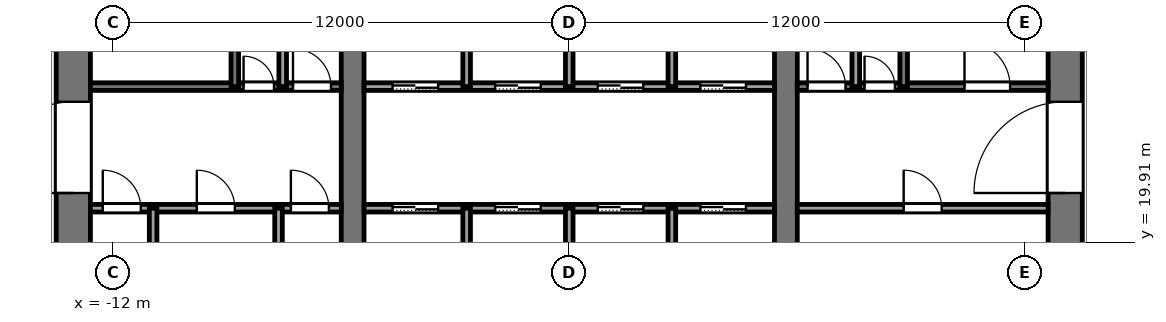
"""IFC4 building model, lengths in metres.
Left out: names, types, materials, properties, quantities, classifications, styles, units other than length and angle.
Written with IfcOpenShell. Run it as: python <this file> out.ifc"""

import sys

from ifc_helpers import new_model, si_unit, direction, frame, frame_2d, origin, place, context, subcontext, project, spatial, rectangle, extrude, element, fill, save


model = new_model("IFC4")
c1 = context("Model", 3, precision=1e-05, world=origin(), true_north=direction((0.0, 1.0)))
c2 = subcontext(c1, "Body", "Model", "MODEL_VIEW")
j1 = project(units=[si_unit("LENGTHUNIT", "METRE"), si_unit("PLANEANGLEUNIT", "RADIAN")], contexts=[c1])
p1 = place(None, origin())
s1 = spatial("IfcSite", under=j1, at=p1, CompositionType="ELEMENT")
p2 = place(p1, origin())
s2 = spatial("IfcBuilding", under=s1, at=p2, CompositionType="ELEMENT")
p3 = place(p2, frame((0.0, 0.0, 202.0)))
s3 = spatial("IfcBuildingStorey", under=s2, at=p3, CompositionType="ELEMENT", Elevation=202.0)
p4 = place(p3, frame((-13.05, 18.4, -0.13), z_axis=(0.0, 0.0, 1.0), x_axis=(0.0, 1.0, 0.0)))
e1 = element("IfcWall", 1, at=p4, inside=s3, PredefinedType="SHEAR", context=c2, shape_type="SweptSolid", body=[
    extrude(rectangle(XDim=19.2, YDim=0.9, at=frame_2d((9.6, 0.0))), origin(), (0.0, 0.0, 1.0), 4.0),
])
p5 = place(p4, frame((2.8, 0.0, 0.13)))
e2 = element("IfcOpeningElement", 2, at=p5, cuts=e1, PredefinedType="OPENING", context=c2, shape_type="SweptSolid", body=[
    extrude(rectangle(XDim=2.4, YDim=2.4, at=frame_2d((1.2, 1.2))), frame((0.0, 0.46, 0.0), z_axis=(0.0, -1.0, 0.0), x_axis=(1.0, 0.0, 0.0)), (0.0, 0.0, 1.0), 0.92),
])
p6 = place(p4, frame((13.4, 0.0, 0.13)))
e3 = element("IfcOpeningElement", 3, at=p6, cuts=e1, PredefinedType="OPENING", context=c2, shape_type="SweptSolid", body=[
    extrude(rectangle(XDim=1.4, YDim=2.2, at=frame_2d((0.7, 1.1))), frame((0.0, 0.46, 0.0), z_axis=(0.0, -1.0, 0.0), x_axis=(1.0, 0.0, 0.0)), (0.0, 0.0, 1.0), 0.92),
])
p7 = place(p3, frame((13.05, 18.4, -0.13), z_axis=(0.0, 0.0, 1.0), x_axis=(0.0, 1.0, 0.0)))
e4 = element("IfcWall", 4, at=p7, inside=s3, PredefinedType="SHEAR", context=c2, shape_type="SweptSolid", body=[
    extrude(rectangle(XDim=19.2, YDim=0.9, at=frame_2d((9.6, 0.0))), origin(), (0.0, 0.0, 1.0), 4.0),
])
p8 = place(p7, frame((2.8, 0.0, 0.13)))
e5 = element("IfcOpeningElement", 5, at=p8, cuts=e4, PredefinedType="OPENING", context=c2, shape_type="SweptSolid", body=[
    extrude(rectangle(XDim=2.4, YDim=2.4, at=frame_2d((1.2, 1.2))), frame((0.0, 0.46, 0.0), z_axis=(0.0, -1.0, 0.0), x_axis=(1.0, 0.0, 0.0)), (0.0, 0.0, 1.0), 0.92),
])
p9 = place(p7, frame((13.3, 0.0, 0.13)))
e6 = element("IfcOpeningElement", 6, at=p9, cuts=e4, PredefinedType="OPENING", context=c2, shape_type="SweptSolid", body=[
    extrude(rectangle(XDim=2.4, YDim=2.4, at=frame_2d((1.2, 1.2))), frame((0.0, 0.46, 0.0), z_axis=(0.0, -1.0, 0.0), x_axis=(1.0, 0.0, 0.0)), (0.0, 0.0, 1.0), 0.92),
])
p10 = place(p3, frame((-5.7, 18.4, -0.13), z_axis=(0.0, 0.0, 1.0), x_axis=(0.0, 1.0, 0.0)))
e7 = element("IfcWall", 7, at=p10, inside=s3, PredefinedType="SHEAR", context=c2, shape_type="SweptSolid", body=[
    extrude(rectangle(XDim=19.2, YDim=0.6, at=frame_2d((9.6, 0.0))), origin(), (0.0, 0.0, 1.0), 4.0),
])
p11 = place(p10, frame((8.35, 0.0, 0.13)))
e8 = element("IfcOpeningElement", 8, at=p11, cuts=e7, PredefinedType="OPENING", context=c2, shape_type="SweptSolid", body=[
    extrude(rectangle(XDim=0.9, YDim=2.1, at=frame_2d((0.45, 1.05))), frame((0.0, 0.31, 0.0), z_axis=(0.0, -1.0, 0.0), x_axis=(1.0, 0.0, 0.0)), (0.0, 0.0, 1.0), 0.62),
])
p12 = place(p3, frame((5.7, 18.4, -0.13), z_axis=(0.0, 0.0, 1.0), x_axis=(0.0, 1.0, 0.0)))
e9 = element("IfcWall", 9, at=p12, inside=s3, PredefinedType="SHEAR", context=c2, shape_type="SweptSolid", body=[
    extrude(rectangle(XDim=19.2, YDim=0.6, at=frame_2d((9.6, 0.0))), origin(), (0.0, 0.0, 1.0), 4.0),
])
p13 = place(p12, frame((8.35, 0.0, 0.13)))
e10 = element("IfcOpeningElement", 10, at=p13, cuts=e9, PredefinedType="OPENING", context=c2, shape_type="SweptSolid", body=[
    extrude(rectangle(XDim=0.9, YDim=2.1, at=frame_2d((0.45, 1.05))), frame((0.0, 0.31, 0.0), z_axis=(0.0, -1.0, 0.0), x_axis=(1.0, 0.0, 0.0)), (0.0, 0.0, 1.0), 0.62),
])
p14 = place(p12, frame((13.3, 0.0, 0.13)))
e11 = element("IfcOpeningElement", 11, at=p14, cuts=e9, PredefinedType="OPENING", context=c2, shape_type="SweptSolid", body=[
    extrude(rectangle(XDim=2.4, YDim=2.4, at=frame_2d((1.2, 1.2))), frame((0.0, 0.31, 0.0), z_axis=(0.0, -1.0, 0.0), x_axis=(1.0, 0.0, 0.0)), (0.0, 0.0, 1.0), 0.62),
])
p15 = place(p3, frame((-12.6, 20.8, 0.0), z_axis=(0.0, 0.0, 1.0), x_axis=(1.0, 0.0, 0.0)))
e12 = element("IfcWall", 12, at=p15, inside=s3, PredefinedType="PARTITIONING", context=c2, shape_type="SweptSolid", body=[
    extrude(rectangle(XDim=6.6, YDim=0.2, at=frame_2d((3.3, 0.0))), origin(), (0.0, 0.0, 1.0), 3.87),
])
p16 = place(p15, frame((0.325, 0.0, 0.0)))
e13 = element("IfcOpeningElement", 13, at=p16, cuts=e12, PredefinedType="OPENING", context=c2, shape_type="SweptSolid", body=[
    extrude(rectangle(XDim=1.0, YDim=2.1, at=frame_2d((0.5, 1.05))), frame((0.0, 0.11, 0.0), z_axis=(0.0, -1.0, 0.0), x_axis=(1.0, 0.0, 0.0)), (0.0, 0.0, 1.0), 0.22),
])
p17 = place(p15, frame((2.8, 0.0, 0.0)))
e14 = element("IfcOpeningElement", 14, at=p17, cuts=e12, PredefinedType="OPENING", context=c2, shape_type="SweptSolid", body=[
    extrude(rectangle(XDim=1.0, YDim=2.1, at=frame_2d((0.5, 1.05))), frame((0.0, 0.11, 0.0), z_axis=(0.0, -1.0, 0.0), x_axis=(1.0, 0.0, 0.0)), (0.0, 0.0, 1.0), 0.22),
])
p18 = place(p15, frame((5.275, 0.0, 0.0)))
e15 = element("IfcOpeningElement", 15, at=p18, cuts=e12, PredefinedType="OPENING", context=c2, shape_type="SweptSolid", body=[
    extrude(rectangle(XDim=1.0, YDim=2.1, at=frame_2d((0.5, 1.05))), frame((0.0, 0.11, 0.0), z_axis=(0.0, -1.0, 0.0), x_axis=(1.0, 0.0, 0.0)), (0.0, 0.0, 1.0), 0.22),
])
p19 = place(p3, frame((-5.4, 20.8, 0.0), z_axis=(0.0, 0.0, 1.0), x_axis=(1.0, 0.0, 0.0)))
e16 = element("IfcWall", 16, at=p19, inside=s3, PredefinedType="PARTITIONING", context=c2, shape_type="SweptSolid", body=[
    extrude(rectangle(XDim=10.8, YDim=0.2, at=frame_2d((5.4, 0.0))), origin(), (0.0, 0.0, 1.0), 3.87),
])
p20 = place(p19, frame((0.75, 0.0, 0.0)))
e17 = element("IfcOpeningElement", 17, at=p20, cuts=e16, PredefinedType="OPENING", context=c2, shape_type="SweptSolid", body=[
    extrude(rectangle(XDim=1.2, YDim=2.2, at=frame_2d((0.6, 1.1))), frame((0.0, 0.11, 0.0), z_axis=(0.0, -1.0, 0.0), x_axis=(1.0, 0.0, 0.0)), (0.0, 0.0, 1.0), 0.22),
])
p21 = place(p19, frame((3.45, 0.0, 0.0)))
e18 = element("IfcOpeningElement", 18, at=p21, cuts=e16, PredefinedType="OPENING", context=c2, shape_type="SweptSolid", body=[
    extrude(rectangle(XDim=1.2, YDim=2.2, at=frame_2d((0.6, 1.1))), frame((0.0, 0.11, 0.0), z_axis=(0.0, -1.0, 0.0), x_axis=(1.0, 0.0, 0.0)), (0.0, 0.0, 1.0), 0.22),
])
p22 = place(p19, frame((6.15, 0.0, 0.0)))
e19 = element("IfcOpeningElement", 19, at=p22, cuts=e16, PredefinedType="OPENING", context=c2, shape_type="SweptSolid", body=[
    extrude(rectangle(XDim=1.2, YDim=2.2, at=frame_2d((0.6, 1.1))), frame((0.0, 0.11, 0.0), z_axis=(0.0, -1.0, 0.0), x_axis=(1.0, 0.0, 0.0)), (0.0, 0.0, 1.0), 0.22),
])
p23 = place(p19, frame((8.85, 0.0, 0.0)))
e20 = element("IfcOpeningElement", 20, at=p23, cuts=e16, PredefinedType="OPENING", context=c2, shape_type="SweptSolid", body=[
    extrude(rectangle(XDim=1.2, YDim=2.2, at=frame_2d((0.6, 1.1))), frame((0.0, 0.11, 0.0), z_axis=(0.0, -1.0, 0.0), x_axis=(1.0, 0.0, 0.0)), (0.0, 0.0, 1.0), 0.22),
])
p24 = place(p3, frame((6.0, 20.8, 0.0), z_axis=(0.0, 0.0, 1.0), x_axis=(1.0, 0.0, 0.0)))
e21 = element("IfcWall", 21, at=p24, inside=s3, PredefinedType="PARTITIONING", context=c2, shape_type="SweptSolid", body=[
    extrude(rectangle(XDim=6.6, YDim=0.2, at=frame_2d((3.3, 0.0))), origin(), (0.0, 0.0, 1.0), 3.87),
])
p25 = place(p24, frame((2.8, 0.0, 0.0)))
e22 = element("IfcOpeningElement", 22, at=p25, cuts=e21, PredefinedType="OPENING", context=c2, shape_type="SweptSolid", body=[
    extrude(rectangle(XDim=1.0, YDim=2.1, at=frame_2d((0.5, 1.05))), frame((0.0, 0.11, 0.0), z_axis=(0.0, -1.0, 0.0), x_axis=(1.0, 0.0, 0.0)), (0.0, 0.0, 1.0), 0.22),
])
p26 = place(p3, frame((-12.6, 24.0, 0.0), z_axis=(0.0, 0.0, 1.0), x_axis=(1.0, 0.0, 0.0)))
e23 = element("IfcWall", 23, at=p26, inside=s3, PredefinedType="PARTITIONING", context=c2, shape_type="SweptSolid", body=[
    extrude(rectangle(XDim=6.6, YDim=0.2, at=frame_2d((3.3, 0.0))), origin(), (0.0, 0.0, 1.0), 3.87),
])
p27 = place(p26, frame((4.03, 0.0, 0.0)))
e24 = element("IfcOpeningElement", 24, at=p27, cuts=e23, PredefinedType="OPENING", context=c2, shape_type="SweptSolid", body=[
    extrude(rectangle(XDim=0.8, YDim=2.1, at=frame_2d((0.4, 1.05))), frame((0.0, 0.11, 0.0), z_axis=(0.0, -1.0, 0.0), x_axis=(1.0, 0.0, 0.0)), (0.0, 0.0, 1.0), 0.22),
])
p28 = place(p26, frame((5.33, 0.0, 0.0)))
e25 = element("IfcOpeningElement", 25, at=p28, cuts=e23, PredefinedType="OPENING", context=c2, shape_type="SweptSolid", body=[
    extrude(rectangle(XDim=1.0, YDim=2.1, at=frame_2d((0.5, 1.05))), frame((0.0, 0.11, 0.0), z_axis=(0.0, -1.0, 0.0), x_axis=(1.0, 0.0, 0.0)), (0.0, 0.0, 1.0), 0.22),
])
p29 = place(p3, frame((-5.4, 24.0, 0.0), z_axis=(0.0, 0.0, 1.0), x_axis=(1.0, 0.0, 0.0)))
e26 = element("IfcWall", 26, at=p29, inside=s3, PredefinedType="PARTITIONING", context=c2, shape_type="SweptSolid", body=[
    extrude(rectangle(XDim=10.8, YDim=0.2, at=frame_2d((5.4, 0.0))), origin(), (0.0, 0.0, 1.0), 3.87),
])
p30 = place(p29, frame((0.75, 0.0, 0.0)))
e27 = element("IfcOpeningElement", 27, at=p30, cuts=e26, PredefinedType="OPENING", context=c2, shape_type="SweptSolid", body=[
    extrude(rectangle(XDim=1.2, YDim=2.2, at=frame_2d((0.6, 1.1))), frame((0.0, 0.11, 0.0), z_axis=(0.0, -1.0, 0.0), x_axis=(1.0, 0.0, 0.0)), (0.0, 0.0, 1.0), 0.22),
])
p31 = place(p29, frame((3.45, 0.0, 0.0)))
e28 = element("IfcOpeningElement", 28, at=p31, cuts=e26, PredefinedType="OPENING", context=c2, shape_type="SweptSolid", body=[
    extrude(rectangle(XDim=1.2, YDim=2.2, at=frame_2d((0.6, 1.1))), frame((0.0, 0.11, 0.0), z_axis=(0.0, -1.0, 0.0), x_axis=(1.0, 0.0, 0.0)), (0.0, 0.0, 1.0), 0.22),
])
p32 = place(p29, frame((6.15, 0.0, 0.0)))
e29 = element("IfcOpeningElement", 29, at=p32, cuts=e26, PredefinedType="OPENING", context=c2, shape_type="SweptSolid", body=[
    extrude(rectangle(XDim=1.2, YDim=2.2, at=frame_2d((0.6, 1.1))), frame((0.0, 0.11, 0.0), z_axis=(0.0, -1.0, 0.0), x_axis=(1.0, 0.0, 0.0)), (0.0, 0.0, 1.0), 0.22),
])
p33 = place(p29, frame((8.85, 0.0, 0.0)))
e30 = element("IfcOpeningElement", 30, at=p33, cuts=e26, PredefinedType="OPENING", context=c2, shape_type="SweptSolid", body=[
    extrude(rectangle(XDim=1.2, YDim=2.2, at=frame_2d((0.6, 1.1))), frame((0.0, 0.11, 0.0), z_axis=(0.0, -1.0, 0.0), x_axis=(1.0, 0.0, 0.0)), (0.0, 0.0, 1.0), 0.22),
])
p34 = place(p3, frame((6.0, 24.0, 0.0), z_axis=(0.0, 0.0, 1.0), x_axis=(1.0, 0.0, 0.0)))
e31 = element("IfcWall", 31, at=p34, inside=s3, PredefinedType="PARTITIONING", context=c2, shape_type="SweptSolid", body=[
    extrude(rectangle(XDim=6.6, YDim=0.2, at=frame_2d((3.3, 0.0))), origin(), (0.0, 0.0, 1.0), 3.87),
])
p35 = place(p34, frame((0.27, 0.0, 0.0)))
e32 = element("IfcOpeningElement", 32, at=p35, cuts=e31, PredefinedType="OPENING", context=c2, shape_type="SweptSolid", body=[
    extrude(rectangle(XDim=1.0, YDim=2.1, at=frame_2d((0.5, 1.05))), frame((0.0, 0.11, 0.0), z_axis=(0.0, -1.0, 0.0), x_axis=(1.0, 0.0, 0.0)), (0.0, 0.0, 1.0), 0.22),
])
p36 = place(p34, frame((1.77, 0.0, 0.0)))
e33 = element("IfcOpeningElement", 33, at=p36, cuts=e31, PredefinedType="OPENING", context=c2, shape_type="SweptSolid", body=[
    extrude(rectangle(XDim=0.8, YDim=2.1, at=frame_2d((0.4, 1.05))), frame((0.0, 0.11, 0.0), z_axis=(0.0, -1.0, 0.0), x_axis=(1.0, 0.0, 0.0)), (0.0, 0.0, 1.0), 0.22),
])
p37 = place(p34, frame((4.4, 0.0, 0.0)))
e34 = element("IfcOpeningElement", 34, at=p37, cuts=e31, PredefinedType="OPENING", context=c2, shape_type="SweptSolid", body=[
    extrude(rectangle(XDim=1.2, YDim=2.2, at=frame_2d((0.6, 1.1))), frame((0.0, 0.11, 0.0), z_axis=(0.0, -1.0, 0.0), x_axis=(1.0, 0.0, 0.0)), (0.0, 0.0, 1.0), 0.22),
])
p38 = place(p3, frame((-10.95, 18.4, 0.0), z_axis=(0.0, 0.0, 1.0), x_axis=(0.0, 1.0, 0.0)))
e35 = element("IfcWall", 35, at=p38, inside=s3, PredefinedType="PARTITIONING", context=c2, shape_type="SweptSolid", body=[
    extrude(rectangle(XDim=2.4, YDim=0.2, at=frame_2d((1.2, 0.0))), origin(), (0.0, 0.0, 1.0), 3.87),
])
p39 = place(p3, frame((-8.8, 24.0, 0.0), z_axis=(0.0, 0.0, 1.0), x_axis=(0.0, 1.0, 0.0)))
e36 = element("IfcWall", 36, at=p39, inside=s3, PredefinedType="PARTITIONING", context=c2, shape_type="SweptSolid", body=[
    extrude(rectangle(XDim=7.4, YDim=0.2, at=frame_2d((3.7, 0.0))), origin(), (0.0, 0.0, 1.0), 3.87),
])
p40 = place(p3, frame((-7.65, 18.4, 0.0), z_axis=(0.0, 0.0, 1.0), x_axis=(0.0, 1.0, 0.0)))
e37 = element("IfcWall", 37, at=p40, inside=s3, PredefinedType="PARTITIONING", context=c2, shape_type="SweptSolid", body=[
    extrude(rectangle(XDim=2.4, YDim=0.2, at=frame_2d((1.2, 0.0))), origin(), (0.0, 0.0, 1.0), 3.87),
])
p41 = place(p3, frame((-7.54, 24.0, 0.0), z_axis=(0.0, 0.0, 1.0), x_axis=(0.0, 1.0, 0.0)))
e38 = element("IfcWall", 38, at=p41, inside=s3, PredefinedType="PARTITIONING", context=c2, shape_type="SweptSolid", body=[
    extrude(rectangle(XDim=7.4, YDim=0.2, at=frame_2d((3.7, 0.0))), origin(), (0.0, 0.0, 1.0), 3.87),
])
p42 = place(p3, frame((-2.7, 18.4, 0.0), z_axis=(0.0, 0.0, 1.0), x_axis=(0.0, 1.0, 0.0)))
e39 = element("IfcWall", 39, at=p42, inside=s3, PredefinedType="PARTITIONING", context=c2, shape_type="SweptSolid", body=[
    extrude(rectangle(XDim=2.4, YDim=0.2, at=frame_2d((1.2, 0.0))), origin(), (0.0, 0.0, 1.0), 3.87),
])
p43 = place(p3, frame((-2.7, 24.0, 0.0), z_axis=(0.0, 0.0, 1.0), x_axis=(0.0, 1.0, 0.0)))
e40 = element("IfcWall", 40, at=p43, inside=s3, PredefinedType="PARTITIONING", context=c2, shape_type="SweptSolid", body=[
    extrude(rectangle(XDim=2.4, YDim=0.2, at=frame_2d((1.2, 0.0))), origin(), (0.0, 0.0, 1.0), 3.87),
])
p44 = place(p3, frame((0.0, 18.4, 0.0), z_axis=(0.0, 0.0, 1.0), x_axis=(0.0, 1.0, 0.0)))
e41 = element("IfcWall", 41, at=p44, inside=s3, PredefinedType="PARTITIONING", context=c2, shape_type="SweptSolid", body=[
    extrude(rectangle(XDim=2.4, YDim=0.2, at=frame_2d((1.2, 0.0))), origin(), (0.0, 0.0, 1.0), 3.87),
])
p45 = place(p3, frame((0.0, 24.0, 0.0), z_axis=(0.0, 0.0, 1.0), x_axis=(0.0, 1.0, 0.0)))
e42 = element("IfcWall", 42, at=p45, inside=s3, PredefinedType="PARTITIONING", context=c2, shape_type="SweptSolid", body=[
    extrude(rectangle(XDim=4.0, YDim=0.2, at=frame_2d((2.0, 0.0))), origin(), (0.0, 0.0, 1.0), 3.87),
])
p46 = place(p3, frame((2.7, 18.4, 0.0), z_axis=(0.0, 0.0, 1.0), x_axis=(0.0, 1.0, 0.0)))
e43 = element("IfcWall", 43, at=p46, inside=s3, PredefinedType="PARTITIONING", context=c2, shape_type="SweptSolid", body=[
    extrude(rectangle(XDim=2.4, YDim=0.2, at=frame_2d((1.2, 0.0))), origin(), (0.0, 0.0, 1.0), 3.87),
])
p47 = place(p3, frame((2.7, 24.0, 0.0), z_axis=(0.0, 0.0, 1.0), x_axis=(0.0, 1.0, 0.0)))
e44 = element("IfcWall", 44, at=p47, inside=s3, PredefinedType="PARTITIONING", context=c2, shape_type="SweptSolid", body=[
    extrude(rectangle(XDim=2.4, YDim=0.2, at=frame_2d((1.2, 0.0))), origin(), (0.0, 0.0, 1.0), 3.87),
])
for number, where, z_axis, x_axis in (
    (45, (7.54, 24.0, 0.0), (0.0, 0.0, 1.0), (0.0, 1.0, 0.0)),
    (46, (8.8, 24.0, 0.0), (0.0, 0.0, 1.0), (0.0, 1.0, 0.0)),
):
    element("IfcWall", number, at=place(p3, frame(where, z_axis=z_axis, x_axis=x_axis)), inside=s3, PredefinedType="PARTITIONING", context=c2, shape_type="SweptSolid", body=[
        extrude(rectangle(XDim=7.4, YDim=0.2, at=frame_2d((3.7, 0.0))), origin(), (0.0, 0.0, 1.0), 3.87),
    ])
p48 = place(p20, origin())
e47 = element("IfcDoor", 47, at=p48, inside=s3, OperationType="SLIDING_TO_LEFT", PredefinedType="DOOR", context=c2, shape_type="SweptSolid", body=[
    extrude(rectangle(XDim=1.2, YDim=2.2, at=frame_2d((0.6, 1.1))), frame((0.0, 0.025, 0.0), z_axis=(0.0, -1.0, 0.0), x_axis=(1.0, 0.0, 0.0)), (0.0, 0.0, 1.0), 0.05),
])
fill(e17, e47)
p49 = place(p21, origin())
e48 = element("IfcDoor", 48, at=p49, inside=s3, OperationType="SLIDING_TO_LEFT", PredefinedType="DOOR", context=c2, shape_type="SweptSolid", body=[
    extrude(rectangle(XDim=1.2, YDim=2.2, at=frame_2d((0.6, 1.1))), frame((0.0, 0.025, 0.0), z_axis=(0.0, -1.0, 0.0), x_axis=(1.0, 0.0, 0.0)), (0.0, 0.0, 1.0), 0.05),
])
fill(e18, e48)
p50 = place(p22, origin())
e49 = element("IfcDoor", 49, at=p50, inside=s3, OperationType="SLIDING_TO_LEFT", PredefinedType="DOOR", context=c2, shape_type="SweptSolid", body=[
    extrude(rectangle(XDim=1.2, YDim=2.2, at=frame_2d((0.6, 1.1))), frame((0.0, 0.025, 0.0), z_axis=(0.0, -1.0, 0.0), x_axis=(1.0, 0.0, 0.0)), (0.0, 0.0, 1.0), 0.05),
])
fill(e19, e49)
p51 = place(p23, origin())
e50 = element("IfcDoor", 50, at=p51, inside=s3, OperationType="SLIDING_TO_LEFT", PredefinedType="DOOR", context=c2, shape_type="SweptSolid", body=[
    extrude(rectangle(XDim=1.2, YDim=2.2, at=frame_2d((0.6, 1.1))), frame((0.0, 0.025, 0.0), z_axis=(0.0, -1.0, 0.0), x_axis=(1.0, 0.0, 0.0)), (0.0, 0.0, 1.0), 0.05),
])
fill(e20, e50)
p52 = place(p30, origin())
e51 = element("IfcDoor", 51, at=p52, inside=s3, OperationType="SLIDING_TO_LEFT", PredefinedType="DOOR", context=c2, shape_type="SweptSolid", body=[
    extrude(rectangle(XDim=1.2, YDim=2.2, at=frame_2d((0.6, 1.1))), frame((0.0, 0.025, 0.0), z_axis=(0.0, -1.0, 0.0), x_axis=(1.0, 0.0, 0.0)), (0.0, 0.0, 1.0), 0.05),
])
fill(e27, e51)
p53 = place(p31, origin())
e52 = element("IfcDoor", 52, at=p53, inside=s3, OperationType="SLIDING_TO_LEFT", PredefinedType="DOOR", context=c2, shape_type="SweptSolid", body=[
    extrude(rectangle(XDim=1.2, YDim=2.2, at=frame_2d((0.6, 1.1))), frame((0.0, 0.025, 0.0), z_axis=(0.0, -1.0, 0.0), x_axis=(1.0, 0.0, 0.0)), (0.0, 0.0, 1.0), 0.05),
])
fill(e28, e52)
p54 = place(p32, origin())
e53 = element("IfcDoor", 53, at=p54, inside=s3, OperationType="SLIDING_TO_LEFT", PredefinedType="DOOR", context=c2, shape_type="SweptSolid", body=[
    extrude(rectangle(XDim=1.2, YDim=2.2, at=frame_2d((0.6, 1.1))), frame((0.0, 0.025, 0.0), z_axis=(0.0, -1.0, 0.0), x_axis=(1.0, 0.0, 0.0)), (0.0, 0.0, 1.0), 0.05),
])
fill(e29, e53)
p55 = place(p33, origin())
e54 = element("IfcDoor", 54, at=p55, inside=s3, OperationType="SLIDING_TO_LEFT", PredefinedType="DOOR", context=c2, shape_type="SweptSolid", body=[
    extrude(rectangle(XDim=1.2, YDim=2.2, at=frame_2d((0.6, 1.1))), frame((0.0, 0.025, 0.0), z_axis=(0.0, -1.0, 0.0), x_axis=(1.0, 0.0, 0.0)), (0.0, 0.0, 1.0), 0.05),
])
fill(e30, e54)
p56 = place(p16, origin())
e55 = element("IfcDoor", 55, at=p56, inside=s3, OperationType="SINGLE_SWING_RIGHT", PredefinedType="DOOR", context=c2, shape_type="SweptSolid", body=[
    extrude(rectangle(XDim=1.0, YDim=2.1, at=frame_2d((0.5, 1.05))), frame((0.0, 0.025, 0.0), z_axis=(0.0, -1.0, 0.0), x_axis=(1.0, 0.0, 0.0)), (0.0, 0.0, 1.0), 0.05),
])
fill(e13, e55)
p57 = place(p17, origin())
e56 = element("IfcDoor", 56, at=p57, inside=s3, OperationType="SINGLE_SWING_RIGHT", PredefinedType="DOOR", context=c2, shape_type="SweptSolid", body=[
    extrude(rectangle(XDim=1.0, YDim=2.1, at=frame_2d((0.5, 1.05))), frame((0.0, 0.025, 0.0), z_axis=(0.0, -1.0, 0.0), x_axis=(1.0, 0.0, 0.0)), (0.0, 0.0, 1.0), 0.05),
])
fill(e14, e56)
p58 = place(p18, origin())
e57 = element("IfcDoor", 57, at=p58, inside=s3, OperationType="SINGLE_SWING_RIGHT", PredefinedType="DOOR", context=c2, shape_type="SweptSolid", body=[
    extrude(rectangle(XDim=1.0, YDim=2.1, at=frame_2d((0.5, 1.05))), frame((0.0, 0.025, 0.0), z_axis=(0.0, -1.0, 0.0), x_axis=(1.0, 0.0, 0.0)), (0.0, 0.0, 1.0), 0.05),
])
fill(e15, e57)
p59 = place(p25, origin())
e58 = element("IfcDoor", 58, at=p59, inside=s3, OperationType="SINGLE_SWING_RIGHT", PredefinedType="DOOR", context=c2, shape_type="SweptSolid", body=[
    extrude(rectangle(XDim=1.0, YDim=2.1, at=frame_2d((0.5, 1.05))), frame((0.0, 0.025, 0.0), z_axis=(0.0, -1.0, 0.0), x_axis=(1.0, 0.0, 0.0)), (0.0, 0.0, 1.0), 0.05),
])
fill(e22, e58)
p60 = place(p27, origin())
e59 = element("IfcDoor", 59, at=p60, inside=s3, OperationType="SINGLE_SWING_RIGHT", PredefinedType="DOOR", context=c2, shape_type="SweptSolid", body=[
    extrude(rectangle(XDim=0.8, YDim=2.1, at=frame_2d((0.4, 1.05))), frame((0.0, 0.025, 0.0), z_axis=(0.0, -1.0, 0.0), x_axis=(1.0, 0.0, 0.0)), (0.0, 0.0, 1.0), 0.05),
])
fill(e24, e59)
p61 = place(p28, origin())
e60 = element("IfcDoor", 60, at=p61, inside=s3, OperationType="SINGLE_SWING_LEFT", PredefinedType="DOOR", context=c2, shape_type="SweptSolid", body=[
    extrude(rectangle(XDim=1.0, YDim=2.1, at=frame_2d((0.5, 1.05))), frame((0.0, 0.025, 0.0), z_axis=(0.0, -1.0, 0.0), x_axis=(1.0, 0.0, 0.0)), (0.0, 0.0, 1.0), 0.05),
])
fill(e25, e60)
p62 = place(p35, origin())
e61 = element("IfcDoor", 61, at=p62, inside=s3, OperationType="SINGLE_SWING_RIGHT", PredefinedType="DOOR", context=c2, shape_type="SweptSolid", body=[
    extrude(rectangle(XDim=1.0, YDim=2.1, at=frame_2d((0.5, 1.05))), frame((0.0, 0.025, 0.0), z_axis=(0.0, -1.0, 0.0), x_axis=(1.0, 0.0, 0.0)), (0.0, 0.0, 1.0), 0.05),
])
fill(e32, e61)
p63 = place(p36, origin())
e62 = element("IfcDoor", 62, at=p63, inside=s3, OperationType="SINGLE_SWING_LEFT", PredefinedType="DOOR", context=c2, shape_type="SweptSolid", body=[
    extrude(rectangle(XDim=0.8, YDim=2.1, at=frame_2d((0.4, 1.05))), frame((0.0, 0.025, 0.0), z_axis=(0.0, -1.0, 0.0), x_axis=(1.0, 0.0, 0.0)), (0.0, 0.0, 1.0), 0.05),
])
fill(e33, e62)
p64 = place(p37, origin())
e63 = element("IfcDoor", 63, at=p64, inside=s3, OperationType="SINGLE_SWING_RIGHT", PredefinedType="DOOR", context=c2, shape_type="SweptSolid", body=[
    extrude(rectangle(XDim=1.2, YDim=2.2, at=frame_2d((0.6, 1.1))), frame((0.0, 0.025, 0.0), z_axis=(0.0, -1.0, 0.0), x_axis=(1.0, 0.0, 0.0)), (0.0, 0.0, 1.0), 0.05),
])
fill(e34, e63)
p65 = place(p5, origin())
e64 = element("IfcDoor", 64, at=p65, inside=s3, OperationType="DOUBLE_DOOR_SINGLE_SWING", PredefinedType="DOOR", context=c2, shape_type="SweptSolid", body=[
    extrude(rectangle(XDim=2.4, YDim=2.4, at=frame_2d((1.2, 1.2))), frame((0.0, 0.025, 0.0), z_axis=(0.0, -1.0, 0.0), x_axis=(1.0, 0.0, 0.0)), (0.0, 0.0, 1.0), 0.05),
])
fill(e2, e64)
p66 = place(p8, origin())
e65 = element("IfcDoor", 65, at=p66, inside=s3, OperationType="DOUBLE_DOOR_SINGLE_SWING", PredefinedType="DOOR", context=c2, shape_type="SweptSolid", body=[
    extrude(rectangle(XDim=2.4, YDim=2.4, at=frame_2d((1.2, 1.2))), frame((0.0, 0.025, 0.0), z_axis=(0.0, -1.0, 0.0), x_axis=(1.0, 0.0, 0.0)), (0.0, 0.0, 1.0), 0.05),
])
fill(e5, e65)
save(model, sys.argv[1])
